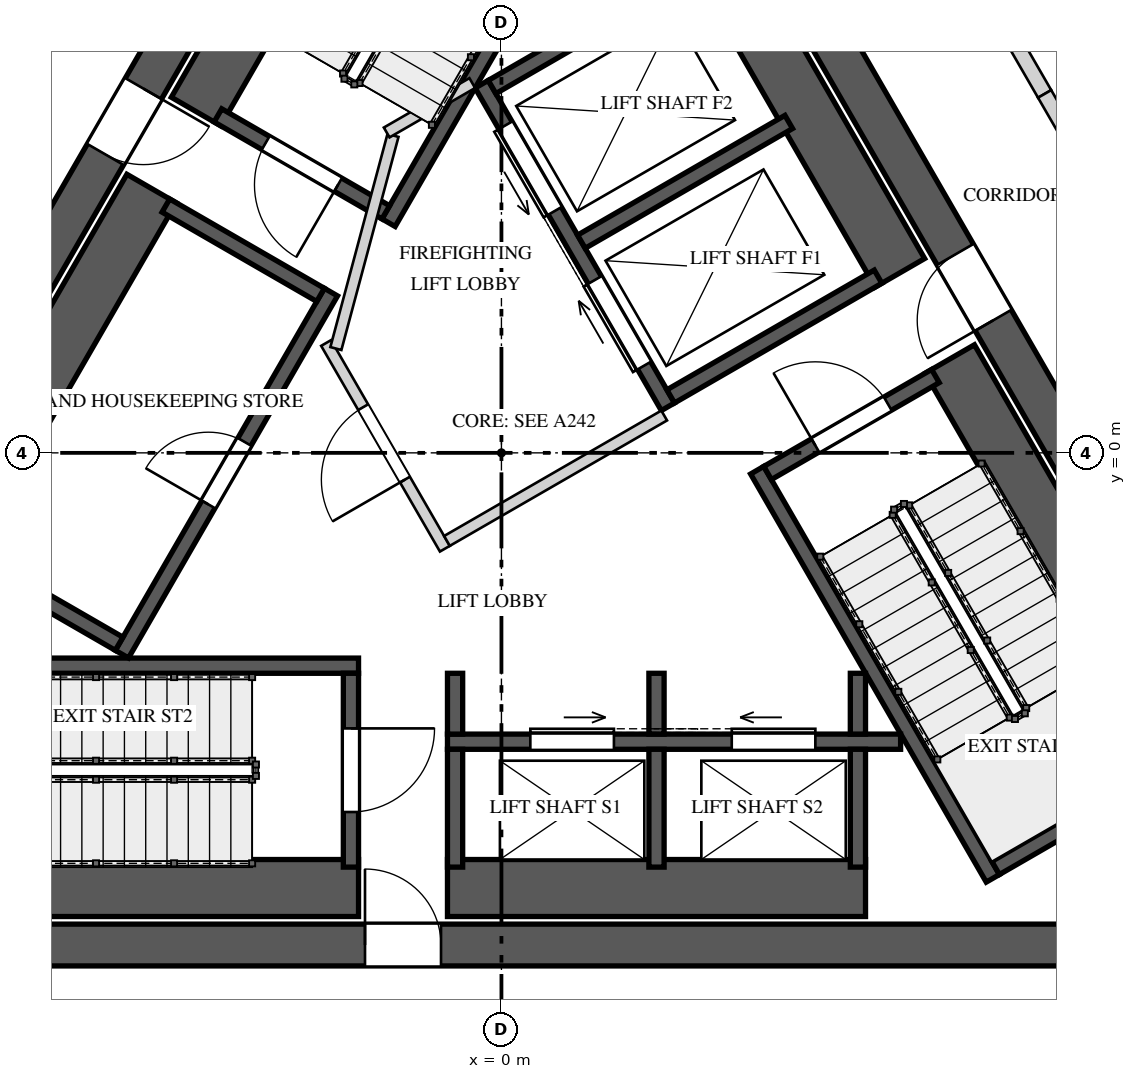
"""IFC4 building model, lengths in metres.
Left out: names, types, materials, properties, quantities, classifications, styles, units other than length and angle.
Written with IfcOpenShell. Run it as: python <this file> out.ifc"""

import sys

from ifc_helpers import new_model, si_unit, direction, frame, frame_2d, origin, place, context, subcontext, project, spatial, rectangle, extrude, element, fill, save


model = new_model("IFC4")
c1 = context("Model", 3, precision=1e-05, world=origin(), true_north=direction((0.0, 1.0)))
c2 = subcontext(c1, "Body", "Model", "MODEL_VIEW")
j1 = project(units=[si_unit("LENGTHUNIT", "METRE"), si_unit("PLANEANGLEUNIT", "RADIAN")], contexts=[c1])
p1 = place(None, origin())
s1 = spatial("IfcSite", under=j1, at=p1, CompositionType="ELEMENT")
p2 = place(p1, origin())
s2 = spatial("IfcBuilding", under=s1, at=p2, CompositionType="ELEMENT")
p3 = place(p2, frame((0.0, 0.0, 320.4)))
s3 = spatial("IfcBuildingStorey", under=s2, at=p3, CompositionType="ELEMENT", Elevation=320.4)
p4 = place(p3, frame((-1.285, 10.725, 0.0), z_axis=(0.0, 0.0, 1.0), x_axis=(-0.499994590896, -0.86602852671, 0.0)))
e1 = element("IfcWall", 1, at=p4, inside=s3, PredefinedType="SHEAR", context=c2, shape_type="SweptSolid", body=[
    extrude(rectangle(XDim=17.292, YDim=0.55, at=frame_2d((8.646, 0.0))), origin(), (0.0, 0.0, 1.0), 4.0),
])
p5 = place(p4, frame((6.851, 0.0, 0.0)))
e2 = element("IfcOpeningElement", 2, at=p5, cuts=e1, PredefinedType="OPENING", context=c2, shape_type="SweptSolid", body=[
    extrude(rectangle(XDim=1.0, YDim=2.4, at=frame_2d((0.5, 1.2))), frame((0.0, 0.285, 0.0), z_axis=(0.0, -1.0, 0.0), x_axis=(1.0, 0.0, 0.0)), (0.0, 0.0, 1.0), 0.57),
])
p6 = place(p4, frame((15.089, 0.0, 0.0)))
e3 = element("IfcOpeningElement", 3, at=p6, cuts=e1, PredefinedType="OPENING", context=c2, shape_type="SweptSolid", body=[
    extrude(rectangle(XDim=0.8, YDim=2.1, at=frame_2d((0.4, 1.05))), frame((0.0, 0.285, 0.0), z_axis=(0.0, -1.0, 0.0), x_axis=(1.0, 0.0, 0.0)), (0.0, 0.0, 1.0), 0.57),
])
p7 = place(p3, frame((-8.646, -6.475, 0.0), z_axis=(0.0, 0.0, 1.0), x_axis=(1.0, 0.0, 0.0)))
e4 = element("IfcWall", 4, at=p7, inside=s3, PredefinedType="SHEAR", context=c2, shape_type="SweptSolid", body=[
    extrude(rectangle(XDim=17.292, YDim=0.55, at=frame_2d((8.646, 0.0))), origin(), (0.0, 0.0, 1.0), 4.0),
])
p8 = place(p7, frame((6.851, 0.0, 0.0)))
e5 = element("IfcOpeningElement", 5, at=p8, cuts=e4, PredefinedType="OPENING", context=c2, shape_type="SweptSolid", body=[
    extrude(rectangle(XDim=1.0, YDim=2.4, at=frame_2d((0.5, 1.2))), frame((0.0, 0.285, 0.0), z_axis=(0.0, -1.0, 0.0), x_axis=(1.0, 0.0, 0.0)), (0.0, 0.0, 1.0), 0.57),
])
p9 = place(p3, frame((9.93, -4.25, 0.0), z_axis=(0.0, 0.0, 1.0), x_axis=(-0.499994590896, 0.86602852671, 0.0)))
e6 = element("IfcWall", 6, at=p9, inside=s3, PredefinedType="SHEAR", context=c2, shape_type="SweptSolid", body=[
    extrude(rectangle(XDim=17.292, YDim=0.55, at=frame_2d((8.646, 0.0))), origin(), (0.0, 0.0, 1.0), 4.0),
])
p10 = place(p9, frame((6.921, 0.0, 0.0)))
e7 = element("IfcOpeningElement", 7, at=p10, cuts=e6, PredefinedType="OPENING", context=c2, shape_type="SweptSolid", body=[
    extrude(rectangle(XDim=1.0, YDim=2.4, at=frame_2d((0.5, 1.2))), frame((0.0, 0.285, 0.0), z_axis=(0.0, -1.0, 0.0), x_axis=(1.0, 0.0, 0.0)), (0.0, 0.0, 1.0), 0.57),
])
p11 = place(p3, frame((-0.918, 9.86, 0.0), z_axis=(0.0, 0.0, 1.0), x_axis=(-0.500026960575, -0.86600983753, 0.0)))
e8 = element("IfcWall", 8, at=p11, inside=s3, PredefinedType="SOLIDWALL", context=c2, shape_type="SweptSolid", body=[
    extrude(rectangle(XDim=6.2, YDim=0.75, at=frame_2d((3.1, 0.0))), origin(), (0.0, 0.0, 1.0), 3.65),
])
p12 = place(p3, frame((1.615, 8.397, 0.0), z_axis=(0.0, 0.0, 1.0), x_axis=(-0.500009909098, -0.866019682689, 0.0)))
e9 = element("IfcWall", 9, at=p12, inside=s3, PredefinedType="SOLIDWALL", context=c2, shape_type="SweptSolid", body=[
    extrude(rectangle(XDim=6.2, YDim=0.2, at=frame_2d((3.1, 0.0))), origin(), (0.0, 0.0, 1.0), 3.65),
])
p13 = place(p3, frame((-1.521, 3.165, 0.0), z_axis=(0.0, 0.0, 1.0), x_axis=(-0.866030925526, 0.499990435942, 0.0)))
e10 = element("IfcWall", 10, at=p13, inside=s3, PredefinedType="SOLIDWALL", context=c2, shape_type="SweptSolid", body=[
    extrude(rectangle(XDim=2.55, YDim=0.2, at=frame_2d((1.275, 0.0))), origin(), (0.0, 0.0, 1.0), 3.65),
])
p14 = place(p13, frame((0.725, 0.0, 0.0)))
e11 = element("IfcOpeningElement", 11, at=p14, cuts=e10, PredefinedType="OPENING", context=c2, shape_type="SweptSolid", body=[
    extrude(rectangle(XDim=1.1, YDim=2.4, at=frame_2d((0.55, 1.2))), frame((0.0, 0.11, 0.0), z_axis=(0.0, -1.0, 0.0), x_axis=(1.0, 0.0, 0.0)), (0.0, 0.0, 1.0), 0.22),
])
p15 = place(p3, frame((-8.08, -5.725, 0.0), z_axis=(0.0, 0.0, 1.0), x_axis=(1.0, 0.0, 0.0)))
e12 = element("IfcWall", 12, at=p15, inside=s3, PredefinedType="SOLIDWALL", context=c2, shape_type="SweptSolid", body=[
    extrude(rectangle(XDim=6.2, YDim=0.75, at=frame_2d((3.1, 0.0))), origin(), (0.0, 0.0, 1.0), 3.65),
])
p16 = place(p3, frame((-8.08, -2.8, 0.0), z_axis=(0.0, 0.0, 1.0), x_axis=(1.0, 0.0, 0.0)))
e13 = element("IfcWall", 13, at=p16, inside=s3, PredefinedType="SOLIDWALL", context=c2, shape_type="SweptSolid", body=[
    extrude(rectangle(XDim=6.2, YDim=0.2, at=frame_2d((3.1, 0.0))), origin(), (0.0, 0.0, 1.0), 3.65),
])
p17 = place(p3, frame((-1.98, -2.9, 0.0), z_axis=(0.0, 0.0, 1.0), x_axis=(0.0, -1.0, 0.0)))
e14 = element("IfcWall", 14, at=p17, inside=s3, PredefinedType="SOLIDWALL", context=c2, shape_type="SweptSolid", body=[
    extrude(rectangle(XDim=2.55, YDim=0.2, at=frame_2d((1.275, 0.0))), origin(), (0.0, 0.0, 1.0), 3.65),
])
p18 = place(p17, frame((0.725, 0.0, 0.0)))
e15 = element("IfcOpeningElement", 15, at=p18, cuts=e14, PredefinedType="OPENING", context=c2, shape_type="SweptSolid", body=[
    extrude(rectangle(XDim=1.1, YDim=2.4, at=frame_2d((0.55, 1.2))), frame((0.0, 0.11, 0.0), z_axis=(0.0, -1.0, 0.0), x_axis=(1.0, 0.0, 0.0)), (0.0, 0.0, 1.0), 0.22),
])
p19 = place(p3, frame((8.998, -4.135, 0.0), z_axis=(0.0, 0.0, 1.0), x_axis=(-0.500009909098, 0.866019682689, 0.0)))
e16 = element("IfcWall", 16, at=p19, inside=s3, PredefinedType="SOLIDWALL", context=c2, shape_type="SweptSolid", body=[
    extrude(rectangle(XDim=6.2, YDim=0.75, at=frame_2d((3.1, 0.0))), origin(), (0.0, 0.0, 1.0), 3.65),
])
p20 = place(p3, frame((6.465, -5.597, 0.0), z_axis=(0.0, 0.0, 1.0), x_axis=(-0.49998037582, 0.866036733513, 0.0)))
e17 = element("IfcWall", 17, at=p20, inside=s3, PredefinedType="SOLIDWALL", context=c2, shape_type="SweptSolid", body=[
    extrude(rectangle(XDim=6.2, YDim=0.2, at=frame_2d((3.1, 0.0))), origin(), (0.0, 0.0, 1.0), 3.65),
])
p21 = place(p3, frame((6.501, -5.461, 0.0), z_axis=(0.0, 0.0, 1.0), x_axis=(0.865989465428, 0.500062241894, 0.0)))
e18 = element("IfcWall", 18, at=p21, inside=s3, PredefinedType="SOLIDWALL", context=c2, shape_type="SweptSolid", body=[
    extrude(rectangle(XDim=2.55, YDim=0.2, at=frame_2d((1.275, 0.0))), origin(), (0.0, 0.0, 1.0), 3.65),
])
p22 = place(p3, frame((3.501, -0.265, 0.0), z_axis=(0.0, 0.0, 1.0), x_axis=(0.866030925526, 0.499990435942, 0.0)))
e19 = element("IfcWall", 19, at=p22, inside=s3, PredefinedType="SOLIDWALL", context=c2, shape_type="SweptSolid", body=[
    extrude(rectangle(XDim=2.55, YDim=0.2, at=frame_2d((1.275, 0.0))), origin(), (0.0, 0.0, 1.0), 3.65),
])
p23 = place(p22, frame((0.725, 0.0, 0.0)))
e20 = element("IfcOpeningElement", 20, at=p23, cuts=e19, PredefinedType="OPENING", context=c2, shape_type="SweptSolid", body=[
    extrude(rectangle(XDim=1.1, YDim=2.4, at=frame_2d((0.55, 1.2))), frame((0.0, 0.11, 0.0), z_axis=(0.0, -1.0, 0.0), x_axis=(1.0, 0.0, 0.0)), (0.0, 0.0, 1.0), 0.22),
])
p24 = place(p3, frame((-4.993, -2.648, 0.0), z_axis=(0.0, 0.0, 1.0), x_axis=(0.499996545922, 0.866027397988, 0.0)))
e21 = element("IfcWall", 21, at=p24, inside=s3, PredefinedType="SOLIDWALL", context=c2, shape_type="SweptSolid", body=[
    extrude(rectangle(XDim=5.5, YDim=0.2, at=frame_2d((2.75, 0.0))), origin(), (0.0, 0.0, 1.0), 3.65),
])
p25 = place(p24, frame((2.275, 0.0, 0.0)))
e22 = element("IfcOpeningElement", 22, at=p25, cuts=e21, PredefinedType="OPENING", context=c2, shape_type="SweptSolid", body=[
    extrude(rectangle(XDim=0.95, YDim=2.4, at=frame_2d((0.475, 1.2))), frame((0.0, 0.11, 0.0), z_axis=(0.0, -1.0, 0.0), x_axis=(1.0, 0.0, 0.0)), (0.0, 0.0, 1.0), 0.22),
])
p26 = place(p3, frame((-4.603, 3.477, 0.0), z_axis=(0.0, 0.0, 1.0), x_axis=(-0.500015767406, -0.866016300277, 0.0)))
e23 = element("IfcWall", 23, at=p26, inside=s3, PredefinedType="SOLIDWALL", context=c2, shape_type="SweptSolid", body=[
    extrude(rectangle(XDim=5.5, YDim=0.75, at=frame_2d((2.75, 0.0))), origin(), (0.0, 0.0, 1.0), 3.65),
])
p27 = place(p3, frame((-2.38, 2.078, 0.0), z_axis=(0.0, 0.0, 1.0), x_axis=(-0.866061024631, 0.499938297808, 0.0)))
e24 = element("IfcWall", 24, at=p27, inside=s3, PredefinedType="SOLIDWALL", context=c2, shape_type="SweptSolid", body=[
    extrude(rectangle(XDim=2.35, YDim=0.2, at=frame_2d((1.175, 0.0))), origin(), (0.0, 0.0, 1.0), 3.65),
])
p28 = place(p3, frame((-5.03, -2.512, 0.0), z_axis=(0.0, 0.0, 1.0), x_axis=(-0.866016039709, 0.500016218704, 0.0)))
e25 = element("IfcWall", 25, at=p28, inside=s3, PredefinedType="SOLIDWALL", context=c2, shape_type="SweptSolid", body=[
    extrude(rectangle(XDim=2.35, YDim=0.2, at=frame_2d((1.175, 0.0))), origin(), (0.0, 0.0, 1.0), 3.65),
])
p29 = place(p3, frame((-0.71, -3.8, 0.0), z_axis=(0.0, 0.0, 1.0), x_axis=(1.0, 0.0, 0.0)))
e26 = element("IfcWall", 26, at=p29, inside=s3, PredefinedType="SOLIDWALL", context=c2, shape_type="SweptSolid", body=[
    extrude(rectangle(XDim=5.961, YDim=0.2, at=frame_2d((2.981, 0.0))), origin(), (0.0, 0.0, 1.0), 3.65),
])
p30 = place(p29, frame((1.09, 0.0, 0.0)))
e27 = element("IfcOpeningElement", 27, at=p30, cuts=e26, PredefinedType="OPENING", context=c2, shape_type="SweptSolid", body=[
    extrude(rectangle(XDim=1.1, YDim=2.1, at=frame_2d((0.55, 1.05))), frame((0.0, 0.11, 0.0), z_axis=(0.0, -1.0, 0.0), x_axis=(1.0, 0.0, 0.0)), (0.0, 0.0, 1.0), 0.22),
])
p31 = place(p29, frame((3.74, 0.0, 0.0)))
e28 = element("IfcOpeningElement", 28, at=p31, cuts=e26, PredefinedType="OPENING", context=c2, shape_type="SweptSolid", body=[
    extrude(rectangle(XDim=1.1, YDim=2.1, at=frame_2d((0.55, 1.05))), frame((0.0, 0.11, 0.0), z_axis=(0.0, -1.0, 0.0), x_axis=(1.0, 0.0, 0.0)), (0.0, 0.0, 1.0), 0.22),
])
p32 = place(p3, frame((-0.71, -5.725, 0.0), z_axis=(0.0, 0.0, 1.0), x_axis=(1.0, 0.0, 0.0)))
e29 = element("IfcWall", 29, at=p32, inside=s3, PredefinedType="SOLIDWALL", context=c2, shape_type="SweptSolid", body=[
    extrude(rectangle(XDim=5.5, YDim=0.75, at=frame_2d((2.75, 0.0))), origin(), (0.0, 0.0, 1.0), 3.65),
])
p33 = place(p3, frame((-0.61, -3.9, 0.0), z_axis=(0.0, 0.0, 1.0), x_axis=(0.0, -1.0, 0.0)))
e30 = element("IfcWall", 30, at=p33, inside=s3, PredefinedType="SOLIDWALL", context=c2, shape_type="SweptSolid", body=[
    extrude(rectangle(XDim=1.55, YDim=0.2, at=frame_2d((0.775, 0.0))), origin(), (0.0, 0.0, 1.0), 3.65),
])
p34 = place(p3, frame((-0.61, -2.9, 0.0), z_axis=(0.0, 0.0, 1.0), x_axis=(0.0, -1.0, 0.0)))
e31 = element("IfcWall", 31, at=p34, inside=s3, PredefinedType="SOLIDWALL", context=c2, shape_type="SweptSolid", body=[
    extrude(rectangle(XDim=0.8, YDim=0.2, at=frame_2d((0.4, 0.0))), origin(), (0.0, 0.0, 1.0), 3.65),
])
p35 = place(p3, frame((2.04, -3.9, 0.0), z_axis=(0.0, 0.0, 1.0), x_axis=(0.0, -1.0, 0.0)))
e32 = element("IfcWall", 32, at=p35, inside=s3, PredefinedType="SOLIDWALL", context=c2, shape_type="SweptSolid", body=[
    extrude(rectangle(XDim=1.55, YDim=0.2, at=frame_2d((0.775, 0.0))), origin(), (0.0, 0.0, 1.0), 3.65),
])
p36 = place(p3, frame((2.04, -2.9, 0.0), z_axis=(0.0, 0.0, 1.0), x_axis=(0.0, -1.0, 0.0)))
e33 = element("IfcWall", 33, at=p36, inside=s3, PredefinedType="SOLIDWALL", context=c2, shape_type="SweptSolid", body=[
    extrude(rectangle(XDim=0.8, YDim=0.2, at=frame_2d((0.4, 0.0))), origin(), (0.0, 0.0, 1.0), 3.65),
])
p37 = place(p3, frame((4.69, -3.9, 0.0), z_axis=(0.0, 0.0, 1.0), x_axis=(0.0, -1.0, 0.0)))
e34 = element("IfcWall", 34, at=p37, inside=s3, PredefinedType="SOLIDWALL", context=c2, shape_type="SweptSolid", body=[
    extrude(rectangle(XDim=1.55, YDim=0.2, at=frame_2d((0.775, 0.0))), origin(), (0.0, 0.0, 1.0), 3.65),
])
p38 = place(p3, frame((4.69, -2.9, 0.0), z_axis=(0.0, 0.0, 1.0), x_axis=(0.0, -1.0, 0.0)))
e35 = element("IfcWall", 35, at=p38, inside=s3, PredefinedType="SOLIDWALL", context=c2, shape_type="SweptSolid", body=[
    extrude(rectangle(XDim=0.8, YDim=0.2, at=frame_2d((0.4, 0.0))), origin(), (0.0, 0.0, 1.0), 3.65),
])
p39 = place(p3, frame((2.19, 0.606, 0.0), z_axis=(0.0, 0.0, 1.0), x_axis=(-0.500002801628, 0.866023786258, 0.0)))
e36 = element("IfcWall", 36, at=p39, inside=s3, PredefinedType="SOLIDWALL", context=c2, shape_type="SweptSolid", body=[
    extrude(rectangle(XDim=4.9, YDim=0.2, at=frame_2d((2.45, 0.0))), origin(), (0.0, 0.0, 1.0), 3.65),
])
p40 = place(p39, frame((0.625, 0.0, 0.0)))
e37 = element("IfcOpeningElement", 37, at=p40, cuts=e36, PredefinedType="OPENING", context=c2, shape_type="SweptSolid", body=[
    extrude(rectangle(XDim=1.3, YDim=2.1, at=frame_2d((0.65, 1.05))), frame((0.0, 0.11, 0.0), z_axis=(0.0, -1.0, 0.0), x_axis=(1.0, 0.0, 0.0)), (0.0, 0.0, 1.0), 0.22),
])
p41 = place(p39, frame((2.975, 0.0, 0.0)))
e38 = element("IfcOpeningElement", 38, at=p41, cuts=e36, PredefinedType="OPENING", context=c2, shape_type="SweptSolid", body=[
    extrude(rectangle(XDim=1.3, YDim=2.1, at=frame_2d((0.65, 1.05))), frame((0.0, 0.11, 0.0), z_axis=(0.0, -1.0, 0.0), x_axis=(1.0, 0.0, 0.0)), (0.0, 0.0, 1.0), 0.22),
])
p42 = place(p3, frame((5.243, 2.369, 0.0), z_axis=(0.0, 0.0, 1.0), x_axis=(-0.500002801628, 0.866023786258, 0.0)))
e39 = element("IfcWall", 39, at=p42, inside=s3, PredefinedType="SOLIDWALL", context=c2, shape_type="SweptSolid", body=[
    extrude(rectangle(XDim=4.9, YDim=0.75, at=frame_2d((2.45, 0.0))), origin(), (0.0, 0.0, 1.0), 3.65),
])
for number, where, z_axis, x_axis in (
    (40, (2.227, 0.743, 0.0), (0.0, 0.0, 1.0), (0.866, 0.5, 0.0)),
    (41, (1.052, 2.778, 0.0), (0.0, 0.0, 1.0), (0.866, 0.5, 0.0)),
    (42, (-0.123, 4.813, 0.0), (0.0, 0.0, 1.0), (0.866, 0.5, 0.0)),
):
    element("IfcWall", number, at=place(p3, frame(where, z_axis=z_axis, x_axis=x_axis)), inside=s3, PredefinedType="SOLIDWALL", context=c2, shape_type="SweptSolid", body=[
        extrude(rectangle(XDim=3.15, YDim=0.2, at=frame_2d((1.575, 0.0))), origin(), (0.0, 0.0, 1.0), 3.65),
    ])
p43 = place(p3, frame((-0.744, -1.261, 0.0), z_axis=(0.0, 0.0, 1.0), x_axis=(-0.500004234368, 0.866022959057, 0.0)))
e43 = element("IfcWall", 43, at=p43, inside=s3, PredefinedType="PARTITIONING", context=c2, shape_type="SweptSolid", body=[
    extrude(rectangle(XDim=3.125, YDim=0.15, at=frame_2d((1.562, 0.0))), origin(), (0.0, 0.0, 1.0), 3.65),
])
p44 = place(p43, frame((1.05, 0.0, 0.0)))
e44 = element("IfcOpeningElement", 44, at=p44, cuts=e43, PredefinedType="OPENING", context=c2, shape_type="SweptSolid", body=[
    extrude(rectangle(XDim=1.1, YDim=2.4, at=frame_2d((0.55, 1.2))), frame((0.0, 0.085, 0.0), z_axis=(0.0, -1.0, 0.0), x_axis=(1.0, 0.0, 0.0)), (0.0, 0.0, 1.0), 0.17),
])
p45 = place(p3, frame((-0.717, -1.159, 0.0), z_axis=(0.0, 0.0, 1.0), x_axis=(0.866008176907, 0.50002983664, 0.0)))
e45 = element("IfcWall", 45, at=p45, inside=s3, PredefinedType="PARTITIONING", context=c2, shape_type="SweptSolid", body=[
    extrude(rectangle(XDim=3.3, YDim=0.15, at=frame_2d((1.65, 0.0))), origin(), (0.0, 0.0, 1.0), 3.65),
])
p46 = place(p3, frame((-2.178, 1.372, 0.0), z_axis=(0.0, 0.0, 1.0), x_axis=(0.258808958833, 0.96592852884, 0.0)))
e46 = element("IfcWall", 46, at=p46, inside=s3, PredefinedType="PARTITIONING", context=c2, shape_type="SweptSolid", body=[
    extrude(rectangle(XDim=2.903, YDim=0.15, at=frame_2d((1.451, 0.0))), origin(), (0.0, 0.0, 1.0), 3.65),
])
p47 = place(p3, frame((-1.51, 4.215, 0.0), z_axis=(0.0, 0.0, 1.0), x_axis=(0.866085525409, 0.49989585183, 0.0)))
e47 = element("IfcWall", 47, at=p47, inside=s3, PredefinedType="PARTITIONING", context=c2, shape_type="SweptSolid", body=[
    extrude(rectangle(XDim=1.3, YDim=0.15, at=frame_2d((0.65, 0.0))), origin(), (0.0, 0.0, 1.0), 3.65),
])
p48 = place(p3, frame((6.693, 5.507, 0.0), z_axis=(0.0, 0.0, 1.0), x_axis=(0.499994660107, -0.866028486751, 0.0)))
e48 = element("IfcWall", 48, at=p48, inside=s3, PredefinedType="SOLIDWALL", context=c2, shape_type="SweptSolid", body=[
    extrude(rectangle(XDim=0.906, YDim=0.2, at=frame_2d((0.453, 0.0))), origin(), (0.0, 0.0, 1.0), 2.55),
])
p49 = place(p3, frame((7.146, 4.722, 0.0), z_axis=(0.0, 0.0, 1.0), x_axis=(0.499955681623, -0.866050989499, 0.0)))
e49 = element("IfcWall", 49, at=p49, inside=s3, PredefinedType="SOLIDWALL", context=c2, shape_type="SweptSolid", body=[
    extrude(rectangle(XDim=1.238, YDim=0.2, at=frame_2d((0.619, 0.0))), origin(), (0.0, 0.0, 1.0), 3.65),
])
p50 = place(p14, origin())
e50 = element("IfcDoor", 50, at=p50, inside=s3, OperationType="SINGLE_SWING_RIGHT", PredefinedType="DOOR", context=c2, shape_type="SweptSolid", body=[
    extrude(rectangle(XDim=1.1, YDim=2.4, at=frame_2d((0.55, 1.2))), frame((0.0, 0.025, 0.0), z_axis=(0.0, -1.0, 0.0), x_axis=(1.0, 0.0, 0.0)), (0.0, 0.0, 1.0), 0.05),
])
fill(e11, e50)
p51 = place(p18, origin())
e51 = element("IfcDoor", 51, at=p51, inside=s3, OperationType="SINGLE_SWING_LEFT", PredefinedType="DOOR", context=c2, shape_type="SweptSolid", body=[
    extrude(rectangle(XDim=1.1, YDim=2.4, at=frame_2d((0.55, 1.2))), frame((0.0, 0.025, 0.0), z_axis=(0.0, -1.0, 0.0), x_axis=(1.0, 0.0, 0.0)), (0.0, 0.0, 1.0), 0.05),
])
fill(e15, e51)
p52 = place(p23, origin())
e52 = element("IfcDoor", 52, at=p52, inside=s3, OperationType="SINGLE_SWING_RIGHT", PredefinedType="DOOR", context=c2, shape_type="SweptSolid", body=[
    extrude(rectangle(XDim=1.1, YDim=2.4, at=frame_2d((0.55, 1.2))), frame((0.0, 0.025, 0.0), z_axis=(0.0, -1.0, 0.0), x_axis=(1.0, 0.0, 0.0)), (0.0, 0.0, 1.0), 0.05),
])
fill(e20, e52)
p53 = place(p25, origin())
e53 = element("IfcDoor", 53, at=p53, inside=s3, OperationType="SINGLE_SWING_LEFT", PredefinedType="DOOR", context=c2, shape_type="SweptSolid", body=[
    extrude(rectangle(XDim=0.95, YDim=2.4, at=frame_2d((0.475, 1.2))), frame((0.0, 0.025, 0.0), z_axis=(0.0, -1.0, 0.0), x_axis=(1.0, 0.0, 0.0)), (0.0, 0.0, 1.0), 0.05),
])
fill(e22, e53)
p54 = place(p30, origin())
e54 = element("IfcDoor", 54, at=p54, inside=s3, OperationType="SLIDING_TO_RIGHT", PredefinedType="DOOR", context=c2, shape_type="SweptSolid", body=[
    extrude(rectangle(XDim=1.1, YDim=2.1, at=frame_2d((0.55, 1.05))), frame((0.0, 0.025, 0.0), z_axis=(0.0, -1.0, 0.0), x_axis=(1.0, 0.0, 0.0)), (0.0, 0.0, 1.0), 0.05),
])
fill(e27, e54)
p55 = place(p31, origin())
e55 = element("IfcDoor", 55, at=p55, inside=s3, OperationType="SLIDING_TO_LEFT", PredefinedType="DOOR", context=c2, shape_type="SweptSolid", body=[
    extrude(rectangle(XDim=1.1, YDim=2.1, at=frame_2d((0.55, 1.05))), frame((0.0, 0.025, 0.0), z_axis=(0.0, -1.0, 0.0), x_axis=(1.0, 0.0, 0.0)), (0.0, 0.0, 1.0), 0.05),
])
fill(e28, e55)
p56 = place(p40, origin())
e56 = element("IfcDoor", 56, at=p56, inside=s3, OperationType="SLIDING_TO_RIGHT", PredefinedType="DOOR", context=c2, shape_type="SweptSolid", body=[
    extrude(rectangle(XDim=1.3, YDim=2.1, at=frame_2d((0.65, 1.05))), frame((0.0, 0.025, 0.0), z_axis=(0.0, -1.0, 0.0), x_axis=(1.0, 0.0, 0.0)), (0.0, 0.0, 1.0), 0.05),
])
fill(e37, e56)
p57 = place(p41, origin())
e57 = element("IfcDoor", 57, at=p57, inside=s3, OperationType="SLIDING_TO_LEFT", PredefinedType="DOOR", context=c2, shape_type="SweptSolid", body=[
    extrude(rectangle(XDim=1.3, YDim=2.1, at=frame_2d((0.65, 1.05))), frame((0.0, 0.025, 0.0), z_axis=(0.0, -1.0, 0.0), x_axis=(1.0, 0.0, 0.0)), (0.0, 0.0, 1.0), 0.05),
])
fill(e38, e57)
p58 = place(p44, origin())
e58 = element("IfcDoor", 58, at=p58, inside=s3, OperationType="SINGLE_SWING_RIGHT", PredefinedType="DOOR", context=c2, shape_type="SweptSolid", body=[
    extrude(rectangle(XDim=1.1, YDim=2.4, at=frame_2d((0.55, 1.2))), frame((0.0, 0.025, 0.0), z_axis=(0.0, -1.0, 0.0), x_axis=(1.0, 0.0, 0.0)), (0.0, 0.0, 1.0), 0.05),
])
fill(e44, e58)
p59 = place(p5, origin())
e59 = element("IfcDoor", 59, at=p59, inside=s3, OperationType="SINGLE_SWING_LEFT", PredefinedType="DOOR", context=c2, shape_type="SweptSolid", body=[
    extrude(rectangle(XDim=1.0, YDim=2.4, at=frame_2d((0.5, 1.2))), frame((0.0, 0.025, 0.0), z_axis=(0.0, -1.0, 0.0), x_axis=(1.0, 0.0, 0.0)), (0.0, 0.0, 1.0), 0.05),
])
fill(e2, e59)
p60 = place(p8, origin())
e60 = element("IfcDoor", 60, at=p60, inside=s3, OperationType="SINGLE_SWING_RIGHT", PredefinedType="DOOR", context=c2, shape_type="SweptSolid", body=[
    extrude(rectangle(XDim=1.0, YDim=2.4, at=frame_2d((0.5, 1.2))), frame((0.0, 0.025, 0.0), z_axis=(0.0, -1.0, 0.0), x_axis=(1.0, 0.0, 0.0)), (0.0, 0.0, 1.0), 0.05),
])
fill(e5, e60)
p61 = place(p10, origin())
e61 = element("IfcDoor", 61, at=p61, inside=s3, OperationType="SINGLE_SWING_LEFT", PredefinedType="DOOR", context=c2, shape_type="SweptSolid", body=[
    extrude(rectangle(XDim=1.0, YDim=2.4, at=frame_2d((0.5, 1.2))), frame((0.0, 0.025, 0.0), z_axis=(0.0, -1.0, 0.0), x_axis=(1.0, 0.0, 0.0)), (0.0, 0.0, 1.0), 0.05),
])
fill(e7, e61)
save(model, sys.argv[1])
